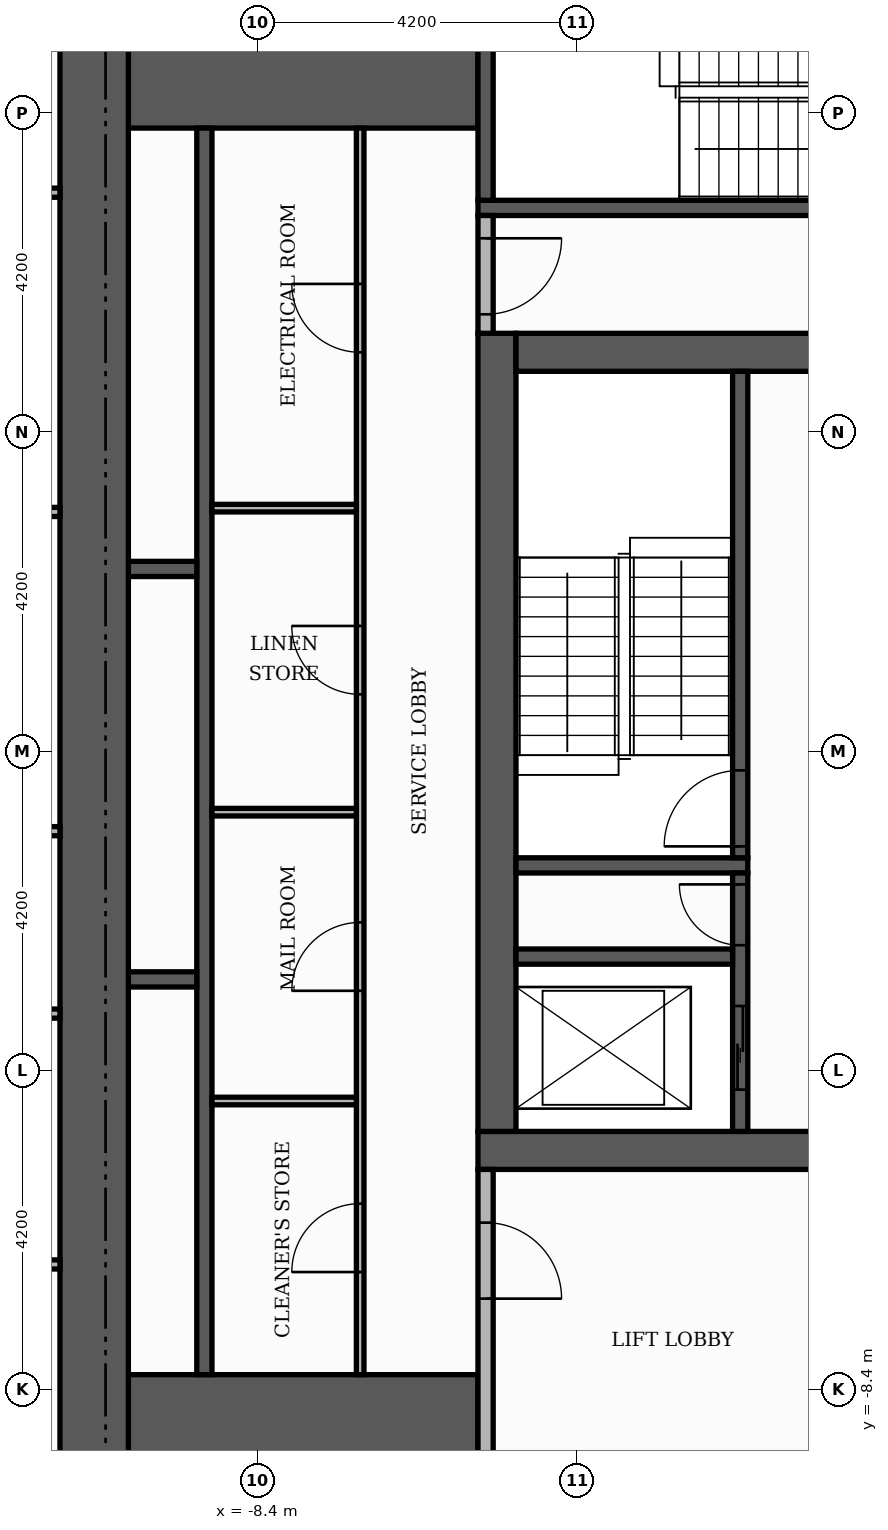
"""IFC4 building model, lengths in metres.
Left out: names, types, materials, properties, quantities, classifications, styles, units other than length and angle.
Written with IfcOpenShell. Run it as: python <this file> out.ifc"""

import sys

from ifc_helpers import new_model, si_unit, direction, frame, frame_2d, origin, place, context, subcontext, project, spatial, rectangle, extrude, element, fill, save


model = new_model("IFC4")
c1 = context("Model", 3, precision=1e-05, world=origin(), true_north=direction((0.0, 1.0)))
c2 = subcontext(c1, "Body", "Model", "MODEL_VIEW")
j1 = project(units=[si_unit("LENGTHUNIT", "METRE"), si_unit("PLANEANGLEUNIT", "RADIAN")], contexts=[c1])
p1 = place(None, origin())
s1 = spatial("IfcSite", under=j1, at=p1, CompositionType="ELEMENT")
p2 = place(p1, origin())
s2 = spatial("IfcBuilding", under=s1, at=p2, CompositionType="ELEMENT")
p3 = place(p2, frame((0.0, 0.0, 256.2)))
s3 = spatial("IfcBuildingStorey", under=s2, at=p3, CompositionType="ELEMENT", Elevation=256.2)
p4 = place(p3, frame((-5.5, -5.25, 0.0), z_axis=(0.0, 0.0, 1.0), x_axis=(1.0, 0.0, 0.0)))
e1 = element("IfcWall", 1, at=p4, inside=s3, PredefinedType="SHEAR", context=c2, shape_type="SweptSolid", body=[
    extrude(rectangle(XDim=11.0, YDim=0.5, at=frame_2d((5.5, 0.0))), origin(), (0.0, 0.0, 1.0), 3.48),
])
p5 = place(p4, frame((4.9, 0.0, 0.0)))
e2 = element("IfcOpeningElement", 2, at=p5, cuts=e1, PredefinedType="OPENING", context=c2, shape_type="SweptSolid", body=[
    extrude(rectangle(XDim=1.2, YDim=2.1, at=frame_2d((0.6, 1.05))), frame((0.0, 0.26, 0.0), z_axis=(0.0, -1.0, 0.0), x_axis=(1.0, 0.0, 0.0)), (0.0, 0.0, 1.0), 0.52),
])
p6 = place(p3, frame((-5.25, -5.0, 0.0), z_axis=(0.0, 0.0, 1.0), x_axis=(0.0, 1.0, 0.0)))
e3 = element("IfcWall", 3, at=p6, inside=s3, PredefinedType="SHEAR", context=c2, shape_type="SweptSolid", body=[
    extrude(rectangle(XDim=10.5, YDim=0.5, at=frame_2d((5.25, 0.0))), origin(), (0.0, 0.0, 1.0), 3.48),
])
p7 = place(p3, frame((-5.0, 5.25, 0.0), z_axis=(0.0, 0.0, 1.0), x_axis=(1.0, 0.0, 0.0)))
e4 = element("IfcWall", 4, at=p7, inside=s3, PredefinedType="SHEAR", context=c2, shape_type="SweptSolid", body=[
    extrude(rectangle(XDim=10.0, YDim=0.5, at=frame_2d((5.0, 0.0))), origin(), (0.0, 0.0, 1.0), 3.48),
])
p8 = place(p7, frame((4.4, 0.0, 0.0)))
e5 = element("IfcOpeningElement", 5, at=p8, cuts=e4, PredefinedType="OPENING", context=c2, shape_type="SweptSolid", body=[
    extrude(rectangle(XDim=1.2, YDim=2.1, at=frame_2d((0.6, 1.05))), frame((0.0, 0.26, 0.0), z_axis=(0.0, -1.0, 0.0), x_axis=(1.0, 0.0, 0.0)), (0.0, 0.0, 1.0), 0.52),
])
for number, where, z_axis, x_axis in (
    (6, (-10.1, -9.15, 0.0), (0.0, 0.0, 1.0), (1.0, 0.0, 0.0)),
    (7, (-10.1, 9.15, 0.0), (0.0, 0.0, 1.0), (1.0, 0.0, 0.0)),
):
    element("IfcWall", number, at=place(p3, frame(where, z_axis=z_axis, x_axis=x_axis)), inside=s3, PredefinedType="SHEAR", context=c2, shape_type="SweptSolid", body=[
        extrude(rectangle(XDim=4.6, YDim=1.9, at=frame_2d((2.3, 0.0))), origin(), (0.0, 0.0, 1.0), 3.48),
    ])
p9 = place(p3, frame((-5.0, -1.5, 0.0), z_axis=(0.0, 0.0, 1.0), x_axis=(1.0, 0.0, 0.0)))
e8 = element("IfcWall", 8, at=p9, inside=s3, PredefinedType="SHEAR", context=c2, shape_type="SweptSolid", body=[
    extrude(rectangle(XDim=3.05, YDim=0.2, at=frame_2d((1.525, 0.0))), origin(), (0.0, 0.0, 1.0), 3.48),
])
p10 = place(p3, frame((-2.05, -1.4, 0.0), z_axis=(0.0, 0.0, 1.0), x_axis=(0.0, 1.0, 0.0)))
e9 = element("IfcWall", 9, at=p10, inside=s3, PredefinedType="SHEAR", context=c2, shape_type="SweptSolid", body=[
    extrude(rectangle(XDim=6.4, YDim=0.2, at=frame_2d((3.2, 0.0))), origin(), (0.0, 0.0, 1.0), 3.48),
])
p11 = place(p10, frame((0.15, 0.0, 0.0)))
e10 = element("IfcOpeningElement", 10, at=p11, cuts=e9, PredefinedType="OPENING", context=c2, shape_type="SweptSolid", body=[
    extrude(rectangle(XDim=1.0, YDim=2.1, at=frame_2d((0.5, 1.05))), frame((0.0, 0.11, 0.0), z_axis=(0.0, -1.0, 0.0), x_axis=(1.0, 0.0, 0.0)), (0.0, 0.0, 1.0), 0.22),
])
p12 = place(p3, frame((-5.5, 7.15, 0.0), z_axis=(0.0, 0.0, 1.0), x_axis=(1.0, 0.0, 0.0)))
e11 = element("IfcWall", 11, at=p12, inside=s3, PredefinedType="SHEAR", context=c2, shape_type="SweptSolid", body=[
    extrude(rectangle(XDim=6.8, YDim=0.2, at=frame_2d((3.4, 0.0))), origin(), (0.0, 0.0, 1.0), 3.48),
])
p13 = place(p3, frame((-5.4, 7.25, 0.0), z_axis=(0.0, 0.0, 1.0), x_axis=(0.0, 1.0, 0.0)))
e12 = element("IfcWall", 12, at=p13, inside=s3, PredefinedType="SHEAR", context=c2, shape_type="SweptSolid", body=[
    extrude(rectangle(XDim=2.85, YDim=0.2, at=frame_2d((1.425, 0.0))), origin(), (0.0, 0.0, 1.0), 3.48),
])
p14 = place(p3, frame((-9.1, -8.2, 0.0), z_axis=(0.0, 0.0, 1.0), x_axis=(0.0, 1.0, 0.0)))
e13 = element("IfcWall", 13, at=p14, inside=s3, PredefinedType="SHEAR", context=c2, shape_type="SweptSolid", body=[
    extrude(rectangle(XDim=16.4, YDim=0.2, at=frame_2d((8.2, 0.0))), origin(), (0.0, 0.0, 1.0), 3.48),
])
p15 = place(p3, frame((-2.05, -5.0, 0.0), z_axis=(0.0, 0.0, 1.0), x_axis=(0.0, 1.0, 0.0)))
e14 = element("IfcWall", 14, at=p15, inside=s3, PredefinedType="SHEAR", context=c2, shape_type="SweptSolid", body=[
    extrude(rectangle(XDim=3.4, YDim=0.2, at=frame_2d((1.7, 0.0))), origin(), (0.0, 0.0, 1.0), 3.48),
])
p16 = place(p15, frame((0.55, 0.0, 0.0)))
e15 = element("IfcOpeningElement", 15, at=p16, cuts=e14, PredefinedType="OPENING", context=c2, shape_type="SweptSolid", body=[
    extrude(rectangle(XDim=1.1, YDim=2.1, at=frame_2d((0.55, 1.05))), frame((0.0, 0.11, 0.0), z_axis=(0.0, -1.0, 0.0), x_axis=(1.0, 0.0, 0.0)), (0.0, 0.0, 1.0), 0.22),
])
p17 = place(p15, frame((2.45, 0.0, 0.0)))
e16 = element("IfcOpeningElement", 16, at=p17, cuts=e14, PredefinedType="OPENING", context=c2, shape_type="SweptSolid", body=[
    extrude(rectangle(XDim=0.8, YDim=2.1, at=frame_2d((0.4, 1.05))), frame((0.0, 0.11, 0.0), z_axis=(0.0, -1.0, 0.0), x_axis=(1.0, 0.0, 0.0)), (0.0, 0.0, 1.0), 0.22),
])
p18 = place(p3, frame((-10.1, -3.0, 0.0), z_axis=(0.0, 0.0, 1.0), x_axis=(1.0, 0.0, 0.0)))
e17 = element("IfcWall", 17, at=p18, inside=s3, PredefinedType="SHEAR", context=c2, shape_type="SweptSolid", body=[
    extrude(rectangle(XDim=0.9, YDim=0.2, at=frame_2d((0.45, 0.0))), origin(), (0.0, 0.0, 1.0), 3.48),
])
p19 = place(p3, frame((-5.0, -2.7, 0.0), z_axis=(0.0, 0.0, 1.0), x_axis=(1.0, 0.0, 0.0)))
e18 = element("IfcWall", 18, at=p19, inside=s3, PredefinedType="SHEAR", context=c2, shape_type="SweptSolid", body=[
    extrude(rectangle(XDim=2.85, YDim=0.2, at=frame_2d((1.425, 0.0))), origin(), (0.0, 0.0, 1.0), 3.48),
])
p20 = place(p3, frame((-10.1, 2.4, 0.0), z_axis=(0.0, 0.0, 1.0), x_axis=(1.0, 0.0, 0.0)))
e19 = element("IfcWall", 19, at=p20, inside=s3, PredefinedType="SHEAR", context=c2, shape_type="SweptSolid", body=[
    extrude(rectangle(XDim=0.9, YDim=0.2, at=frame_2d((0.45, 0.0))), origin(), (0.0, 0.0, 1.0), 3.48),
])
p21 = place(p3, frame((-10.55, -10.1, 0.0), z_axis=(0.0, 0.0, 1.0), x_axis=(0.0, 1.0, 0.0)))
e20 = element("IfcWall", 20, at=p21, inside=s3, PredefinedType="SHEAR", context=c2, shape_type="SweptSolid", body=[
    extrude(rectangle(XDim=20.2, YDim=0.9, at=frame_2d((10.1, 0.0))), origin(), (0.0, 0.0, 1.0), 3.48),
])
p22 = place(p3, frame((-5.4, -10.1, 0.0), z_axis=(0.0, 0.0, 1.0), x_axis=(0.0, 1.0, 0.0)))
e21 = element("IfcWall", 21, at=p22, inside=s3, PredefinedType="PARTITIONING", context=c2, shape_type="SweptSolid", body=[
    extrude(rectangle(XDim=4.6, YDim=0.2, at=frame_2d((2.3, 0.0))), origin(), (0.0, 0.0, 1.0), 3.48),
])
p23 = place(p22, frame((2.9, 0.0, 0.0)))
e22 = element("IfcOpeningElement", 22, at=p23, cuts=e21, PredefinedType="OPENING", context=c2, shape_type="SweptSolid", body=[
    extrude(rectangle(XDim=1.0, YDim=2.1, at=frame_2d((0.5, 1.05))), frame((0.0, 0.11, 0.0), z_axis=(0.0, -1.0, 0.0), x_axis=(1.0, 0.0, 0.0)), (0.0, 0.0, 1.0), 0.22),
])
p24 = place(p3, frame((-7.05, -8.2, 0.0), z_axis=(0.0, 0.0, 1.0), x_axis=(0.0, 1.0, 0.0)))
e23 = element("IfcWall", 23, at=p24, inside=s3, PredefinedType="PARTITIONING", context=c2, shape_type="SweptSolid", body=[
    extrude(rectangle(XDim=16.4, YDim=0.1, at=frame_2d((8.2, 0.0))), origin(), (0.0, 0.0, 1.0), 3.48),
])
p25 = place(p24, frame((1.35, 0.0, 0.0)))
e24 = element("IfcOpeningElement", 24, at=p25, cuts=e23, PredefinedType="OPENING", context=c2, shape_type="SweptSolid", body=[
    extrude(rectangle(XDim=0.9, YDim=2.1, at=frame_2d((0.45, 1.05))), frame((0.0, 0.06, 0.0), z_axis=(0.0, -1.0, 0.0), x_axis=(1.0, 0.0, 0.0)), (0.0, 0.0, 1.0), 0.12),
])
p26 = place(p24, frame((5.05, 0.0, 0.0)))
e25 = element("IfcOpeningElement", 25, at=p26, cuts=e23, PredefinedType="OPENING", context=c2, shape_type="SweptSolid", body=[
    extrude(rectangle(XDim=0.9, YDim=2.1, at=frame_2d((0.45, 1.05))), frame((0.0, 0.06, 0.0), z_axis=(0.0, -1.0, 0.0), x_axis=(1.0, 0.0, 0.0)), (0.0, 0.0, 1.0), 0.12),
])
p27 = place(p24, frame((8.95, 0.0, 0.0)))
e26 = element("IfcOpeningElement", 26, at=p27, cuts=e23, PredefinedType="OPENING", context=c2, shape_type="SweptSolid", body=[
    extrude(rectangle(XDim=0.9, YDim=2.1, at=frame_2d((0.45, 1.05))), frame((0.0, 0.06, 0.0), z_axis=(0.0, -1.0, 0.0), x_axis=(1.0, 0.0, 0.0)), (0.0, 0.0, 1.0), 0.12),
])
p28 = place(p24, frame((13.45, 0.0, 0.0)))
e27 = element("IfcOpeningElement", 27, at=p28, cuts=e23, PredefinedType="OPENING", context=c2, shape_type="SweptSolid", body=[
    extrude(rectangle(XDim=0.9, YDim=2.1, at=frame_2d((0.45, 1.05))), frame((0.0, 0.06, 0.0), z_axis=(0.0, -1.0, 0.0), x_axis=(1.0, 0.0, 0.0)), (0.0, 0.0, 1.0), 0.12),
])
for number, where, z_axis, x_axis in (
    (28, (-9.0, -4.6, 0.0), (0.0, 0.0, 1.0), (1.0, 0.0, 0.0)),
    (29, (-9.0, -0.8, 0.0), (0.0, 0.0, 1.0), (1.0, 0.0, 0.0)),
    (30, (-9.0, 3.2, 0.0), (0.0, 0.0, 1.0), (1.0, 0.0, 0.0)),
):
    element("IfcWall", number, at=place(p3, frame(where, z_axis=z_axis, x_axis=x_axis)), inside=s3, PredefinedType="PARTITIONING", context=c2, shape_type="SweptSolid", body=[
        extrude(rectangle(XDim=1.9, YDim=0.1, at=frame_2d((0.95, 0.0))), origin(), (0.0, 0.0, 1.0), 3.48),
    ])
p29 = place(p3, frame((-5.4, 5.5, 0.0), z_axis=(0.0, 0.0, 1.0), x_axis=(0.0, 1.0, 0.0)))
e31 = element("IfcWall", 31, at=p29, inside=s3, PredefinedType="PARTITIONING", context=c2, shape_type="SweptSolid", body=[
    extrude(rectangle(XDim=1.55, YDim=0.2, at=frame_2d((0.775, 0.0))), origin(), (0.0, 0.0, 1.0), 3.48),
])
p30 = place(p29, frame((0.25, 0.0, 0.0)))
e32 = element("IfcOpeningElement", 32, at=p30, cuts=e31, PredefinedType="OPENING", context=c2, shape_type="SweptSolid", body=[
    extrude(rectangle(XDim=1.0, YDim=2.1, at=frame_2d((0.5, 1.05))), frame((0.0, 0.11, 0.0), z_axis=(0.0, -1.0, 0.0), x_axis=(1.0, 0.0, 0.0)), (0.0, 0.0, 1.0), 0.22),
])
for number, where, z_axis, x_axis in (
    (33, (-19.22, -6.75, 0.0), (0.0, 0.0, 1.0), (1.0, 0.0, 0.0)),
    (34, (-19.22, -3.45, 0.0), (0.0, 0.0, 1.0), (1.0, 0.0, 0.0)),
    (35, (-19.22, -1.05, 0.0), (0.0, 0.0, 1.0), (1.0, 0.0, 0.0)),
    (36, (-19.22, 3.15, 0.0), (0.0, 0.0, 1.0), (1.0, 0.0, 0.0)),
):
    element("IfcWall", number, at=place(p3, frame(where, z_axis=z_axis, x_axis=x_axis)), inside=s3, PredefinedType="PARTITIONING", context=c2, shape_type="SweptSolid", body=[
        extrude(rectangle(XDim=8.22, YDim=0.12, at=frame_2d((4.11, 0.0))), origin(), (0.0, 0.0, 1.0), 3.48),
    ])
p31 = place(p3, frame((-19.22, 7.35, 0.0), z_axis=(0.0, 0.0, 1.0), x_axis=(1.0, 0.0, 0.0)))
e37 = element("IfcWall", 37, at=p31, inside=s3, PredefinedType="PARTITIONING", context=c2, shape_type="SweptSolid", body=[
    extrude(rectangle(XDim=8.22, YDim=0.12, at=frame_2d((4.11, 0.0))), origin(), (0.0, 0.0, 1.0), 3.48),
])
p32 = place(p31, frame((3.66, 0.0, 0.0)))
e38 = element("IfcOpeningElement", 38, at=p32, cuts=e37, PredefinedType="OPENING", context=c2, shape_type="SweptSolid", body=[
    extrude(rectangle(XDim=0.9, YDim=2.1, at=frame_2d((0.45, 1.05))), frame((0.0, 0.07, 0.0), z_axis=(0.0, -1.0, 0.0), x_axis=(1.0, 0.0, 0.0)), (0.0, 0.0, 1.0), 0.14),
])
p33 = place(p16, origin())
e39 = element("IfcDoor", 39, at=p33, inside=s3, OperationType="SLIDING_TO_LEFT", PredefinedType="DOOR", context=c2, shape_type="SweptSolid", body=[
    extrude(rectangle(XDim=1.1, YDim=2.1, at=frame_2d((0.55, 1.05))), frame((0.0, 0.025, 0.0), z_axis=(0.0, -1.0, 0.0), x_axis=(1.0, 0.0, 0.0)), (0.0, 0.0, 1.0), 0.05),
])
fill(e15, e39)
p34 = place(p11, origin())
e40 = element("IfcDoor", 40, at=p34, inside=s3, OperationType="SINGLE_SWING_LEFT", PredefinedType="DOOR", context=c2, shape_type="SweptSolid", body=[
    extrude(rectangle(XDim=1.0, YDim=2.1, at=frame_2d((0.5, 1.05))), frame((0.0, 0.025, 0.0), z_axis=(0.0, -1.0, 0.0), x_axis=(1.0, 0.0, 0.0)), (0.0, 0.0, 1.0), 0.05),
])
fill(e10, e40)
p35 = place(p17, origin())
e41 = element("IfcDoor", 41, at=p35, inside=s3, OperationType="SINGLE_SWING_RIGHT", PredefinedType="DOOR", context=c2, shape_type="SweptSolid", body=[
    extrude(rectangle(XDim=0.8, YDim=2.1, at=frame_2d((0.4, 1.05))), frame((0.0, 0.025, 0.0), z_axis=(0.0, -1.0, 0.0), x_axis=(1.0, 0.0, 0.0)), (0.0, 0.0, 1.0), 0.05),
])
fill(e16, e41)
p36 = place(p30, frame((1.0, 0.0, 0.0), z_axis=(0.0, 0.0, 1.0), x_axis=(-1.0, 0.0, 0.0)))
e42 = element("IfcDoor", 42, at=p36, inside=s3, OperationType="SINGLE_SWING_RIGHT", PredefinedType="DOOR", context=c2, shape_type="SweptSolid", body=[
    extrude(rectangle(XDim=1.0, YDim=2.1, at=frame_2d((0.5, 1.05))), frame((0.0, 0.025, 0.0), z_axis=(0.0, -1.0, 0.0), x_axis=(1.0, 0.0, 0.0)), (0.0, 0.0, 1.0), 0.05),
])
fill(e32, e42)
p37 = place(p23, frame((1.0, 0.0, 0.0), z_axis=(0.0, 0.0, 1.0), x_axis=(-1.0, 0.0, 0.0)))
e43 = element("IfcDoor", 43, at=p37, inside=s3, OperationType="SINGLE_SWING_LEFT", PredefinedType="DOOR", context=c2, shape_type="SweptSolid", body=[
    extrude(rectangle(XDim=1.0, YDim=2.1, at=frame_2d((0.5, 1.05))), frame((0.0, 0.025, 0.0), z_axis=(0.0, -1.0, 0.0), x_axis=(1.0, 0.0, 0.0)), (0.0, 0.0, 1.0), 0.05),
])
fill(e22, e43)
p38 = place(p25, origin())
e44 = element("IfcDoor", 44, at=p38, inside=s3, OperationType="SINGLE_SWING_LEFT", PredefinedType="DOOR", context=c2, shape_type="SweptSolid", body=[
    extrude(rectangle(XDim=0.9, YDim=2.1, at=frame_2d((0.45, 1.05))), frame((0.0, 0.025, 0.0), z_axis=(0.0, -1.0, 0.0), x_axis=(1.0, 0.0, 0.0)), (0.0, 0.0, 1.0), 0.05),
])
fill(e24, e44)
p39 = place(p26, origin())
e45 = element("IfcDoor", 45, at=p39, inside=s3, OperationType="SINGLE_SWING_LEFT", PredefinedType="DOOR", context=c2, shape_type="SweptSolid", body=[
    extrude(rectangle(XDim=0.9, YDim=2.1, at=frame_2d((0.45, 1.05))), frame((0.0, 0.025, 0.0), z_axis=(0.0, -1.0, 0.0), x_axis=(1.0, 0.0, 0.0)), (0.0, 0.0, 1.0), 0.05),
])
fill(e25, e45)
p40 = place(p27, origin())
e46 = element("IfcDoor", 46, at=p40, inside=s3, OperationType="SINGLE_SWING_RIGHT", PredefinedType="DOOR", context=c2, shape_type="SweptSolid", body=[
    extrude(rectangle(XDim=0.9, YDim=2.1, at=frame_2d((0.45, 1.05))), frame((0.0, 0.025, 0.0), z_axis=(0.0, -1.0, 0.0), x_axis=(1.0, 0.0, 0.0)), (0.0, 0.0, 1.0), 0.05),
])
fill(e26, e46)
p41 = place(p28, origin())
e47 = element("IfcDoor", 47, at=p41, inside=s3, OperationType="SINGLE_SWING_RIGHT", PredefinedType="DOOR", context=c2, shape_type="SweptSolid", body=[
    extrude(rectangle(XDim=0.9, YDim=2.1, at=frame_2d((0.45, 1.05))), frame((0.0, 0.025, 0.0), z_axis=(0.0, -1.0, 0.0), x_axis=(1.0, 0.0, 0.0)), (0.0, 0.0, 1.0), 0.05),
])
fill(e27, e47)
save(model, sys.argv[1])
